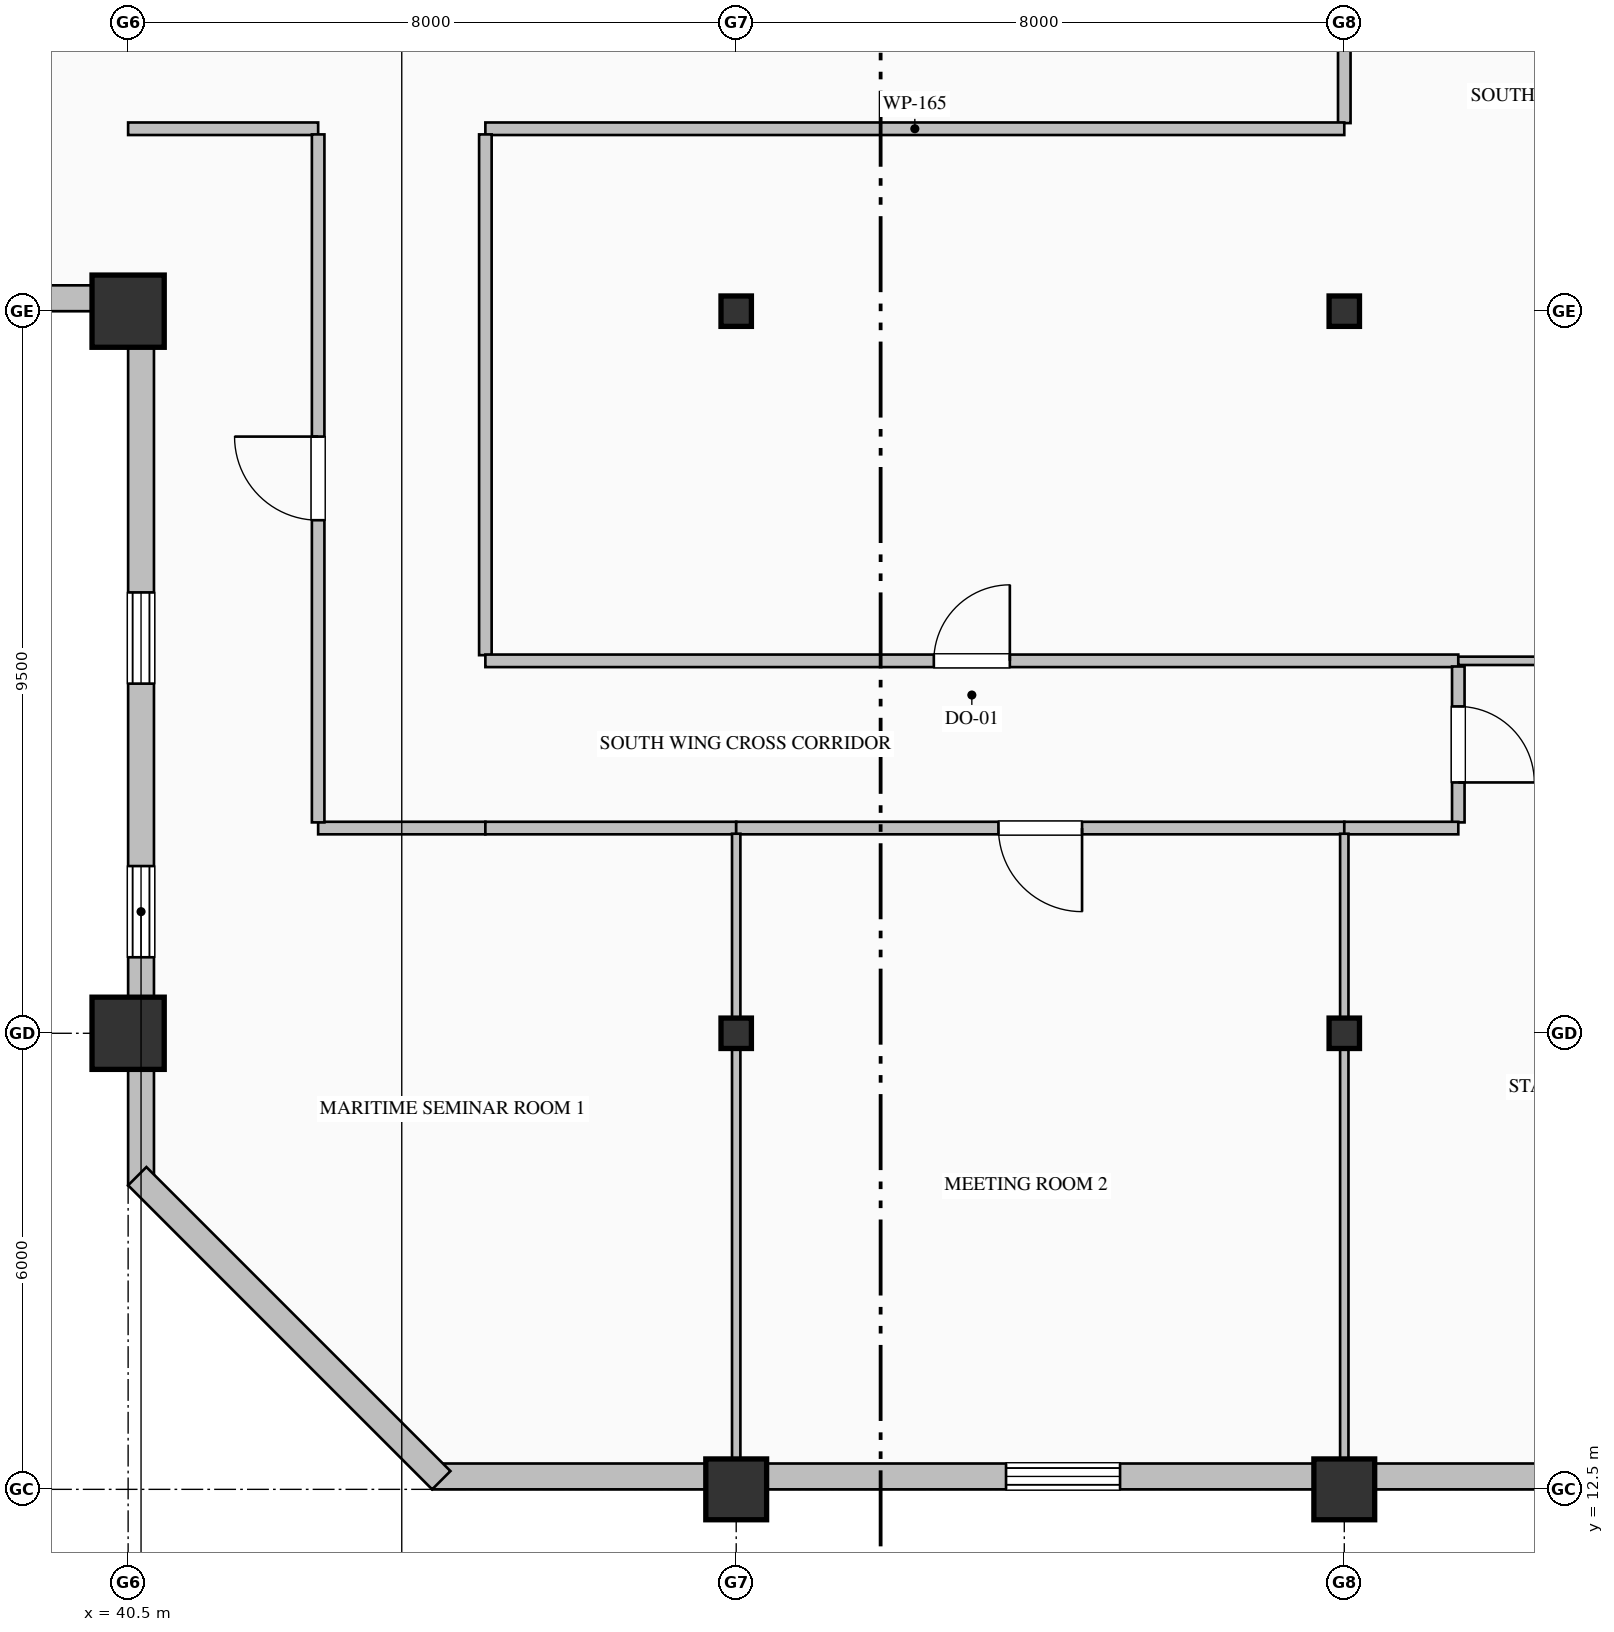
"""IFC4 building model, lengths in metres.
Left out: names, types, materials, properties, quantities, classifications, styles, units other than length and angle.
Written with IfcOpenShell. Run it as: python <this file> out.ifc"""

import sys

from ifc_helpers import new_model, si_unit, direction, frame, frame_2d, origin, origin_2d, place, context, subcontext, project, spatial, rectangle, hollow_rectangle, i_section, extrude, element, fill, save


model = new_model("IFC4")
c1 = context("Model", 3, precision=1e-05, world=origin(), true_north=direction((0.0, 1.0)))
c2 = subcontext(c1, "Body", "Model", "MODEL_VIEW")
j1 = project(units=[si_unit("LENGTHUNIT", "METRE"), si_unit("PLANEANGLEUNIT", "RADIAN")], contexts=[c1])
p1 = place(None, origin())
s1 = spatial("IfcSite", under=j1, at=p1, CompositionType="ELEMENT")
p2 = place(p1, origin())
s2 = spatial("IfcBuilding", under=s1, at=p2, CompositionType="ELEMENT")
p3 = place(p2, frame((0.0, 0.0, 221.8)))
s3 = spatial("IfcBuildingStorey", under=s2, at=p3, CompositionType="ELEMENT", Elevation=221.8)
for number, where, z_axis, x_axis in (
    (1, (40.5, 18.5, 0.0), (0.0, 0.0, 1.0), (1.0, 0.0, 0.0)),
    (2, (40.5, 28.0, 0.0), (0.0, 0.0, 1.0), (1.0, 0.0, 0.0)),
):
    element("IfcColumn", number, at=place(p3, frame(where, z_axis=z_axis, x_axis=x_axis)), inside=s3, PredefinedType="COLUMN", context=c2, shape_type="SweptSolid", body=[
        extrude(hollow_rectangle(XDim=0.95, YDim=0.95, WallThickness=0.036, at=origin_2d()), origin(), (0.0, 0.0, 1.0), 4.0),
    ])
p4 = place(p3, frame((48.5, 12.5, 0.0), z_axis=(0.0, 0.0, 1.0), x_axis=(1.0, 0.0, 0.0)))
e3 = element("IfcColumn", 3, at=p4, inside=s3, PredefinedType="COLUMN", context=c2, shape_type="SweptSolid", body=[
    extrude(hollow_rectangle(XDim=0.8, YDim=0.8, WallThickness=0.032, at=origin_2d()), origin(), (0.0, 0.0, 1.0), 4.0),
])
for number, where, z_axis, x_axis in (
    (4, (48.5, 18.5, 0.0), (0.0, 0.0, 1.0), (1.0, 0.0, 0.0)),
    (5, (48.5, 28.0, 0.0), (0.0, 0.0, 1.0), (1.0, 0.0, 0.0)),
):
    element("IfcColumn", number, at=place(p3, frame(where, z_axis=z_axis, x_axis=x_axis)), inside=s3, PredefinedType="COLUMN", context=c2, shape_type="SweptSolid", body=[
        extrude(i_section(OverallWidth=0.4, OverallDepth=0.4, WebThickness=0.013, FlangeThickness=0.021, FilletRadius=0.022, at=origin_2d()), origin(), (0.0, 0.0, 1.0), 4.0),
    ])
p5 = place(p3, frame((56.5, 12.5, 0.0), z_axis=(0.0, 0.0, 1.0), x_axis=(1.0, 0.0, 0.0)))
e6 = element("IfcColumn", 6, at=p5, inside=s3, PredefinedType="COLUMN", context=c2, shape_type="SweptSolid", body=[
    extrude(hollow_rectangle(XDim=0.8, YDim=0.8, WallThickness=0.032, at=origin_2d()), origin(), (0.0, 0.0, 1.0), 4.0),
])
for number, where, z_axis, x_axis in (
    (7, (56.5, 18.5, 0.0), (0.0, 0.0, 1.0), (1.0, 0.0, 0.0)),
    (8, (56.5, 28.0, 0.0), (0.0, 0.0, 1.0), (1.0, 0.0, 0.0)),
):
    element("IfcColumn", number, at=place(p3, frame(where, z_axis=z_axis, x_axis=x_axis)), inside=s3, PredefinedType="COLUMN", context=c2, shape_type="SweptSolid", body=[
        extrude(i_section(OverallWidth=0.4, OverallDepth=0.4, WebThickness=0.013, FlangeThickness=0.021, FilletRadius=0.022, at=origin_2d()), origin(), (0.0, 0.0, 1.0), 4.0),
    ])
p6 = place(p3, frame((40.67, 16.5, 0.0), z_axis=(0.0, 0.0, 1.0), x_axis=(0.0, 1.0, 0.0)))
e9 = element("IfcWall", 9, at=p6, inside=s3, PredefinedType="SOLIDWALL", context=c2, shape_type="SweptSolid", body=[
    extrude(rectangle(XDim=11.84, YDim=0.34, at=frame_2d((5.92, 0.0))), origin(), (0.0, 0.0, 1.0), 3.187),
])
p7 = place(p6, frame((3.0, 0.0, 0.7)))
e10 = element("IfcOpeningElement", 10, at=p7, cuts=e9, PredefinedType="OPENING", context=c2, shape_type="SweptSolid", body=[
    extrude(rectangle(XDim=1.2, YDim=1.85, at=frame_2d((0.6, 0.925))), frame((0.0, 0.18, 0.0), z_axis=(0.0, -1.0, 0.0), x_axis=(1.0, 0.0, 0.0)), (0.0, 0.0, 1.0), 0.36),
])
p8 = place(p6, frame((6.6, 0.0, 0.9)))
e11 = element("IfcOpeningElement", 11, at=p8, cuts=e9, PredefinedType="OPENING", context=c2, shape_type="SweptSolid", body=[
    extrude(rectangle(XDim=1.2, YDim=1.85, at=frame_2d((0.6, 0.925))), frame((0.0, 0.18, 0.0), z_axis=(0.0, -1.0, 0.0), x_axis=(1.0, 0.0, 0.0)), (0.0, 0.0, 1.0), 0.36),
])
p9 = place(p3, frame((40.52, 28.17, 0.0), z_axis=(0.0, 0.0, 1.0), x_axis=(-1.0, 0.0, 0.0)))
e12 = element("IfcWall", 12, at=p9, inside=s3, PredefinedType="SOLIDWALL", context=c2, shape_type="SweptSolid", body=[
    extrude(rectangle(XDim=27.52, YDim=0.34, at=frame_2d((13.76, 0.0))), origin(), (0.0, 0.0, 1.0), 3.187),
])
p10 = place(p9, frame((10.2, 0.0, 0.7)))
e13 = element("IfcOpeningElement", 13, at=p10, cuts=e12, PredefinedType="OPENING", context=c2, shape_type="SweptSolid", body=[
    extrude(rectangle(XDim=1.2, YDim=1.85, at=frame_2d((0.6, 0.925))), frame((0.0, 0.18, 0.0), z_axis=(0.0, -1.0, 0.0), x_axis=(1.0, 0.0, 0.0)), (0.0, 0.0, 1.0), 0.36),
])
p11 = place(p9, frame((13.8, 0.0, 0.9)))
e14 = element("IfcOpeningElement", 14, at=p11, cuts=e12, PredefinedType="OPENING", context=c2, shape_type="SweptSolid", body=[
    extrude(rectangle(XDim=1.2, YDim=1.85, at=frame_2d((0.6, 0.925))), frame((0.0, 0.18, 0.0), z_axis=(0.0, -1.0, 0.0), x_axis=(1.0, 0.0, 0.0)), (0.0, 0.0, 1.0), 0.36),
])
p12 = place(p9, frame((17.325, 0.0, 0.9)))
e15 = element("IfcOpeningElement", 15, at=p12, cuts=e12, PredefinedType="OPENING", context=c2, shape_type="SweptSolid", body=[
    extrude(rectangle(XDim=1.35, YDim=1.85, at=frame_2d((0.675, 0.925))), frame((0.0, 0.18, 0.0), z_axis=(0.0, -1.0, 0.0), x_axis=(1.0, 0.0, 0.0)), (0.0, 0.0, 1.0), 0.36),
])
p13 = place(p9, frame((21.0, 0.0, 0.7)))
e16 = element("IfcOpeningElement", 16, at=p13, cuts=e12, PredefinedType="OPENING", context=c2, shape_type="SweptSolid", body=[
    extrude(rectangle(XDim=1.2, YDim=1.85, at=frame_2d((0.6, 0.925))), frame((0.0, 0.18, 0.0), z_axis=(0.0, -1.0, 0.0), x_axis=(1.0, 0.0, 0.0)), (0.0, 0.0, 1.0), 0.36),
])
p14 = place(p3, frame((60.0, 12.67, 0.0), z_axis=(0.0, 0.0, 1.0), x_axis=(-1.0, 0.0, 0.0)))
e17 = element("IfcWall", 17, at=p14, inside=s3, PredefinedType="SOLIDWALL", context=c2, shape_type="SweptSolid", body=[
    extrude(rectangle(XDim=15.5, YDim=0.34, at=frame_2d((7.75, 0.0))), origin(), (0.0, 0.0, 1.0), 3.325),
])
p15 = place(p14, frame((6.45, 0.0, 0.7)))
e18 = element("IfcOpeningElement", 18, at=p15, cuts=e17, PredefinedType="OPENING", context=c2, shape_type="SweptSolid", body=[
    extrude(rectangle(XDim=1.5, YDim=2.4, at=frame_2d((0.75, 1.2))), frame((0.0, 0.18, 0.0), z_axis=(0.0, -1.0, 0.0), x_axis=(1.0, 0.0, 0.0)), (0.0, 0.0, 1.0), 0.36),
])
p16 = place(p3, frame((44.62, 12.62, 0.0), z_axis=(0.0, 0.0, 1.0), x_axis=(-0.707106781187, 0.707106781187, 0.0)))
e19 = element("IfcWall", 19, at=p16, inside=s3, PredefinedType="SOLIDWALL", context=c2, shape_type="SweptSolid", body=[
    extrude(rectangle(XDim=5.657, YDim=0.34, at=frame_2d((2.828, 0.0))), origin(), (0.0, 0.0, 1.0), 3.775),
])
p17 = place(p3, frame((56.5, 36.0, 0.0), z_axis=(0.0, 0.0, 1.0), x_axis=(0.0, -1.0, 0.0)))
e20 = element("IfcWall", 20, at=p17, inside=s3, PredefinedType="PARTITIONING", context=c2, shape_type="SweptSolid", body=[
    extrude(rectangle(XDim=5.525, YDim=0.165, at=frame_2d((2.763, 0.0))), origin(), (0.0, 0.0, 1.0), 3.179),
])
p18 = place(p3, frame((56.5, 30.4, 0.0), z_axis=(0.0, 0.0, 1.0), x_axis=(-1.0, 0.0, 0.0)))
e21 = element("IfcWall", 21, at=p18, inside=s3, PredefinedType="PARTITIONING", context=c2, shape_type="SweptSolid", body=[
    extrude(rectangle(XDim=11.3, YDim=0.165, at=frame_2d((5.65, 0.0))), origin(), (0.0, 0.0, 1.0), 3.775),
])
p19 = place(p3, frame((43.0, 30.4, 0.0), z_axis=(0.0, 0.0, 1.0), x_axis=(-1.0, 0.0, 0.0)))
e22 = element("IfcWall", 22, at=p19, inside=s3, PredefinedType="PARTITIONING", context=c2, shape_type="SweptSolid", body=[
    extrude(rectangle(XDim=2.5, YDim=0.165, at=frame_2d((1.25, 0.0))), origin(), (0.0, 0.0, 1.0), 3.775),
])
p20 = place(p3, frame((45.2, 30.325, 0.0), z_axis=(0.0, 0.0, 1.0), x_axis=(0.0, -1.0, 0.0)))
e23 = element("IfcWall", 23, at=p20, inside=s3, PredefinedType="PARTITIONING", context=c2, shape_type="SweptSolid", body=[
    extrude(rectangle(XDim=6.851, YDim=0.165, at=frame_2d((3.425, 0.0))), origin(), (0.0, 0.0, 1.0), 3.775),
])
p21 = place(p3, frame((45.2, 21.2, 0.0), z_axis=(0.0, 0.0, 1.0), x_axis=(-1.0, 0.0, 0.0)))
e24 = element("IfcWall", 24, at=p21, inside=s3, PredefinedType="PARTITIONING", context=c2, shape_type="SweptSolid", body=[
    extrude(rectangle(XDim=2.2, YDim=0.165, at=frame_2d((1.1, 0.0))), origin(), (0.0, 0.0, 1.0), 3.775),
])
p22 = place(p3, frame((43.0, 21.274, 0.0), z_axis=(0.0, 0.0, 1.0), x_axis=(0.0, 1.0, 0.0)))
e25 = element("IfcWall", 25, at=p22, inside=s3, PredefinedType="PARTITIONING", context=c2, shape_type="SweptSolid", body=[
    extrude(rectangle(XDim=9.051, YDim=0.165, at=frame_2d((4.525, 0.0))), origin(), (0.0, 0.0, 1.0), 3.775),
])
p23 = place(p22, frame((3.976, 0.0, 0.0)))
e26 = element("IfcOpeningElement", 26, at=p23, cuts=e25, PredefinedType="OPENING", context=c2, shape_type="SweptSolid", body=[
    extrude(rectangle(XDim=1.1, YDim=2.2, at=frame_2d((0.55, 1.1))), frame((0.0, 0.093, 0.0), z_axis=(0.0, -1.0, 0.0), x_axis=(1.0, 0.0, 0.0)), (0.0, 0.0, 1.0), 0.185),
])
p24 = place(p3, frame((45.2, 23.4, 0.0), z_axis=(0.0, 0.0, 1.0), x_axis=(1.0, 0.0, 0.0)))
e27 = element("IfcWall", 27, at=p24, inside=s3, PredefinedType="PARTITIONING", context=c2, shape_type="SweptSolid", body=[
    extrude(rectangle(XDim=12.8, YDim=0.165, at=frame_2d((6.4, 0.0))), origin(), (0.0, 0.0, 1.0), 3.467),
])
p25 = place(p24, frame((5.9, 0.0, 0.0)))
e28 = element("IfcOpeningElement", 28, at=p25, cuts=e27, PredefinedType="OPENING", context=c2, shape_type="SweptSolid", body=[
    extrude(rectangle(XDim=1.0, YDim=2.15, at=frame_2d((0.5, 1.075))), frame((0.0, 0.093, 0.0), z_axis=(0.0, -1.0, 0.0), x_axis=(1.0, 0.0, 0.0)), (0.0, 0.0, 1.0), 0.185),
])
p26 = place(p3, frame((48.5, 21.2, 0.0), z_axis=(0.0, 0.0, 1.0), x_axis=(-1.0, 0.0, 0.0)))
e29 = element("IfcWall", 29, at=p26, inside=s3, PredefinedType="PARTITIONING", context=c2, shape_type="SweptSolid", body=[
    extrude(rectangle(XDim=3.3, YDim=0.165, at=frame_2d((1.65, 0.0))), origin(), (0.0, 0.0, 1.0), 3.775),
])
p27 = place(p3, frame((56.5, 21.2, 0.0), z_axis=(0.0, 0.0, 1.0), x_axis=(-1.0, 0.0, 0.0)))
e30 = element("IfcWall", 30, at=p27, inside=s3, PredefinedType="PARTITIONING", context=c2, shape_type="SweptSolid", body=[
    extrude(rectangle(XDim=8.0, YDim=0.165, at=frame_2d((4.0, 0.0))), origin(), (0.0, 0.0, 1.0), 3.775),
])
p28 = place(p27, frame((3.45, 0.0, 0.0)))
e31 = element("IfcOpeningElement", 31, at=p28, cuts=e30, PredefinedType="OPENING", context=c2, shape_type="SweptSolid", body=[
    extrude(rectangle(XDim=1.1, YDim=2.2, at=frame_2d((0.55, 1.1))), frame((0.0, 0.093, 0.0), z_axis=(0.0, -1.0, 0.0), x_axis=(1.0, 0.0, 0.0)), (0.0, 0.0, 1.0), 0.185),
])
p29 = place(p3, frame((58.0, 23.325, 0.0), z_axis=(0.0, 0.0, 1.0), x_axis=(0.0, -1.0, 0.0)))
e32 = element("IfcWall", 32, at=p29, inside=s3, PredefinedType="PARTITIONING", context=c2, shape_type="SweptSolid", body=[
    extrude(rectangle(XDim=2.051, YDim=0.165, at=frame_2d((1.025, 0.0))), origin(), (0.0, 0.0, 1.0), 3.775),
])
p30 = place(p29, frame((0.525, 0.0, 0.0)))
e33 = element("IfcOpeningElement", 33, at=p30, cuts=e32, PredefinedType="OPENING", context=c2, shape_type="SweptSolid", body=[
    extrude(rectangle(XDim=1.0, YDim=2.15, at=frame_2d((0.5, 1.075))), frame((0.0, 0.093, 0.0), z_axis=(0.0, -1.0, 0.0), x_axis=(1.0, 0.0, 0.0)), (0.0, 0.0, 1.0), 0.185),
])
p31 = place(p3, frame((58.0, 21.2, 0.0), z_axis=(0.0, 0.0, 1.0), x_axis=(-1.0, 0.0, 0.0)))
e34 = element("IfcWall", 34, at=p31, inside=s3, PredefinedType="PARTITIONING", context=c2, shape_type="SweptSolid", body=[
    extrude(rectangle(XDim=1.5, YDim=0.165, at=frame_2d((0.75, 0.0))), origin(), (0.0, 0.0, 1.0), 3.775),
])
p32 = place(p3, frame((63.668, 23.4, 0.0), z_axis=(0.0, 0.0, 1.0), x_axis=(-1.0, 0.0, 0.0)))
e35 = element("IfcWall", 35, at=p32, inside=s3, PredefinedType="MOVABLE", context=c2, shape_type="SweptSolid", body=[
    extrude(rectangle(XDim=5.668, YDim=0.11, at=frame_2d((2.834, 0.0))), origin(), (0.0, 0.0, 1.0), 3.775),
])
for number, where, z_axis, x_axis in (
    (36, (48.5, 21.125, 0.0), (0.0, 0.0, 1.0), (0.0, -1.0, 0.0)),
    (37, (56.5, 21.125, 0.0), (0.0, 0.0, 1.0), (0.0, -1.0, 0.0)),
):
    element("IfcWall", number, at=place(p3, frame(where, z_axis=z_axis, x_axis=x_axis)), inside=s3, PredefinedType="MOVABLE", context=c2, shape_type="SweptSolid", body=[
        extrude(rectangle(XDim=8.293, YDim=0.11, at=frame_2d((4.147, 0.0))), origin(), (0.0, 0.0, 1.0), 2.967),
    ])
p33 = place(p7, origin())
e38 = element("IfcWindow", 38, at=p33, inside=s3, PartitioningType="DOUBLE_PANEL_VERTICAL", PredefinedType="WINDOW", context=c2, shape_type="SweptSolid", body=[
    extrude(rectangle(XDim=1.2, YDim=1.85, at=frame_2d((0.6, 0.925))), frame((0.0, 0.15, 0.0), z_axis=(0.0, -1.0, 0.0), x_axis=(1.0, 0.0, 0.0)), (0.0, 0.0, 1.0), 0.06),
])
fill(e10, e38)
p34 = place(p8, origin())
e39 = element("IfcWindow", 39, at=p34, inside=s3, PartitioningType="DOUBLE_PANEL_VERTICAL", PredefinedType="WINDOW", context=c2, shape_type="SweptSolid", body=[
    extrude(rectangle(XDim=1.2, YDim=1.85, at=frame_2d((0.6, 0.925))), frame((0.0, 0.15, 0.0), z_axis=(0.0, -1.0, 0.0), x_axis=(1.0, 0.0, 0.0)), (0.0, 0.0, 1.0), 0.06),
])
fill(e11, e39)
p35 = place(p15, origin())
e40 = element("IfcWindow", 40, at=p35, inside=s3, PartitioningType="DOUBLE_PANEL_HORIZONTAL", PredefinedType="WINDOW", context=c2, shape_type="SweptSolid", body=[
    extrude(rectangle(XDim=1.5, YDim=2.4, at=frame_2d((0.75, 1.2))), frame((0.0, 0.15, 0.0), z_axis=(0.0, -1.0, 0.0), x_axis=(1.0, 0.0, 0.0)), (0.0, 0.0, 1.0), 0.06),
])
fill(e18, e40)
p36 = place(p25, origin())
e41 = element("IfcDoor", 41, at=p36, inside=s3, OperationType="SINGLE_SWING_RIGHT", PredefinedType="DOOR", context=c2, shape_type="SweptSolid", body=[
    extrude(rectangle(XDim=1.0, YDim=2.15, at=frame_2d((0.5, 1.075))), frame((0.0, 0.025, 0.0), z_axis=(0.0, -1.0, 0.0), x_axis=(1.0, 0.0, 0.0)), (0.0, 0.0, 1.0), 0.05),
])
fill(e28, e41)
p37 = place(p23, origin())
e42 = element("IfcDoor", 42, at=p37, inside=s3, OperationType="SINGLE_SWING_RIGHT", PredefinedType="DOOR", context=c2, shape_type="SweptSolid", body=[
    extrude(rectangle(XDim=1.1, YDim=2.2, at=frame_2d((0.55, 1.1))), frame((0.0, 0.025, 0.0), z_axis=(0.0, -1.0, 0.0), x_axis=(1.0, 0.0, 0.0)), (0.0, 0.0, 1.0), 0.05),
])
fill(e26, e42)
p38 = place(p28, origin())
e43 = element("IfcDoor", 43, at=p38, inside=s3, OperationType="SINGLE_SWING_LEFT", PredefinedType="DOOR", context=c2, shape_type="SweptSolid", body=[
    extrude(rectangle(XDim=1.1, YDim=2.2, at=frame_2d((0.55, 1.1))), frame((0.0, 0.025, 0.0), z_axis=(0.0, -1.0, 0.0), x_axis=(1.0, 0.0, 0.0)), (0.0, 0.0, 1.0), 0.05),
])
fill(e31, e43)
p39 = place(p30, origin())
e44 = element("IfcDoor", 44, at=p39, inside=s3, OperationType="SINGLE_SWING_RIGHT", PredefinedType="DOOR", context=c2, shape_type="SweptSolid", body=[
    extrude(rectangle(XDim=1.0, YDim=2.15, at=frame_2d((0.5, 1.075))), frame((0.0, 0.025, 0.0), z_axis=(0.0, -1.0, 0.0), x_axis=(1.0, 0.0, 0.0)), (0.0, 0.0, 1.0), 0.05),
])
fill(e33, e44)
save(model, sys.argv[1])
